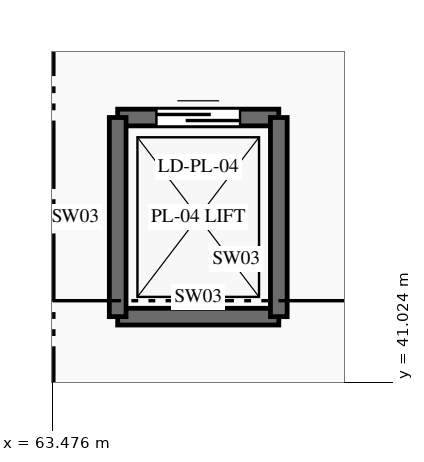
"""IFC4 building model, lengths in metres.
Left out: names, types, materials, properties, quantities, classifications, styles, units other than length and angle.
Written with IfcOpenShell. Run it as: python <this file> out.ifc"""

import sys

from ifc_helpers import new_model, si_unit, direction, frame, frame_2d, origin, place, context, subcontext, project, spatial, rectangle, extrude, element, fill, save


model = new_model("IFC4")
c1 = context("Model", 3, precision=1e-05, world=origin(), true_north=direction((0.0, 1.0)))
c2 = subcontext(c1, "Body", "Model", "MODEL_VIEW")
j1 = project(units=[si_unit("LENGTHUNIT", "METRE"), si_unit("PLANEANGLEUNIT", "RADIAN")], contexts=[c1])
p1 = place(None, origin())
s1 = spatial("IfcSite", under=j1, at=p1, CompositionType="ELEMENT")
p2 = place(p1, origin())
s2 = spatial("IfcBuilding", under=s1, at=p2, CompositionType="ELEMENT")
p3 = place(p2, origin())
s3 = spatial("IfcBuildingStorey", under=s2, at=p3, CompositionType="ELEMENT", Elevation=0.0)
p4 = place(p3, frame((64.34, 41.89, 0.0), z_axis=(0.0, 0.0, 1.0), x_axis=(1.0, 0.0, 0.0)))
e1 = element("IfcWall", 1, at=p4, inside=s3, PredefinedType="SHEAR", context=c2, shape_type="SweptSolid", body=[
    extrude(rectangle(XDim=2.12, YDim=0.22, at=frame_2d((1.06, 0.0))), origin(), (0.0, 0.0, 1.0), 6.0),
])
p5 = place(p3, frame((64.34, 44.51, 0.0), z_axis=(0.0, 0.0, 1.0), x_axis=(1.0, 0.0, 0.0)))
e2 = element("IfcWall", 2, at=p5, inside=s3, PredefinedType="SHEAR", context=c2, shape_type="SweptSolid", body=[
    extrude(rectangle(XDim=2.12, YDim=0.22, at=frame_2d((1.06, 0.0))), origin(), (0.0, 0.0, 1.0), 6.0),
])
p6 = place(p5, frame((0.51, 0.0, 0.0)))
e3 = element("IfcOpeningElement", 3, at=p6, cuts=e2, PredefinedType="OPENING", context=c2, shape_type="SweptSolid", body=[
    extrude(rectangle(XDim=1.1, YDim=2.15, at=frame_2d((0.55, 1.075))), frame((0.0, 0.125, 0.0), z_axis=(0.0, -1.0, 0.0), x_axis=(1.0, 0.0, 0.0)), (0.0, 0.0, 1.0), 0.25),
])
for number, where, z_axis, x_axis in (
    (4, (64.34, 41.89, 0.0), (0.0, 0.0, 1.0), (0.0, 1.0, 0.0)),
    (5, (66.46, 41.89, 0.0), (0.0, 0.0, 1.0), (0.0, 1.0, 0.0)),
):
    element("IfcWall", number, at=place(p3, frame(where, z_axis=z_axis, x_axis=x_axis)), inside=s3, PredefinedType="SHEAR", context=c2, shape_type="SweptSolid", body=[
        extrude(rectangle(XDim=2.62, YDim=0.22, at=frame_2d((1.31, 0.0))), origin(), (0.0, 0.0, 1.0), 6.0),
    ])
p7 = place(p6, origin())
e6 = element("IfcDoor", 6, at=p7, inside=s3, OperationType="SLIDING_TO_LEFT", PredefinedType="DOOR", context=c2, shape_type="SweptSolid", body=[
    extrude(rectangle(XDim=1.1, YDim=2.15, at=frame_2d((0.55, 1.075))), frame((0.0, 0.025, 0.0), z_axis=(0.0, -1.0, 0.0), x_axis=(1.0, 0.0, 0.0)), (0.0, 0.0, 1.0), 0.05),
])
fill(e3, e6)
save(model, sys.argv[1])
